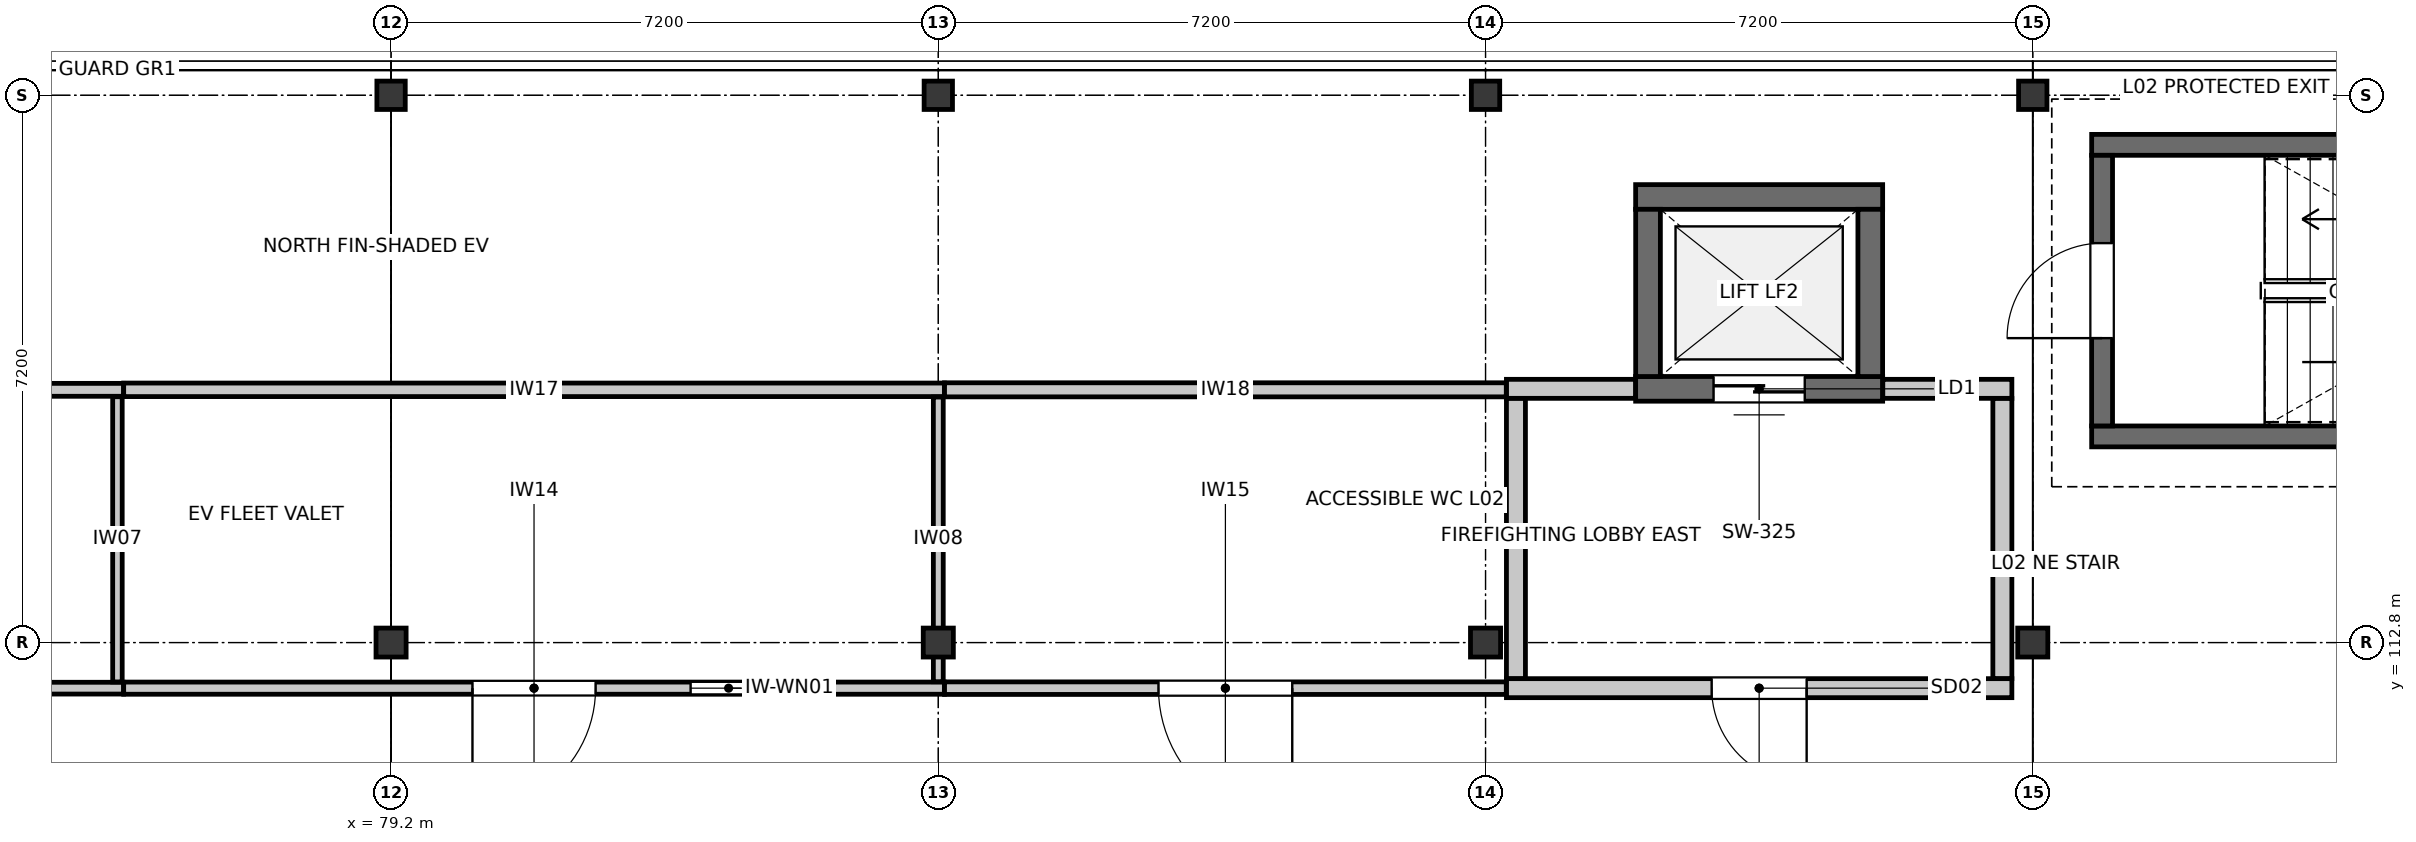
"""IFC4 building model, lengths in metres.
Left out: names, types, materials, properties, quantities, classifications, styles, units other than length and angle.
Written with IfcOpenShell. Run it as: python <this file> out.ifc"""

import sys

from ifc_helpers import new_model, si_unit, direction, frame, frame_2d, origin, origin_2d, place, context, subcontext, project, spatial, rectangle, i_section, extrude, element, fill, save


model = new_model("IFC4")
c1 = context("Model", 3, precision=1e-05, world=origin(), true_north=direction((0.0, 1.0)))
c2 = subcontext(c1, "Body", "Model", "MODEL_VIEW")
j1 = project(units=[si_unit("LENGTHUNIT", "METRE"), si_unit("PLANEANGLEUNIT", "RADIAN")], contexts=[c1])
p1 = place(None, origin())
s1 = spatial("IfcSite", under=j1, at=p1, CompositionType="ELEMENT")
p2 = place(p1, origin())
s2 = spatial("IfcBuilding", under=s1, at=p2, CompositionType="ELEMENT")
p3 = place(p2, frame((0.0, 0.0, 9.3)))
s3 = spatial("IfcBuildingStorey", under=s2, at=p3, CompositionType="ELEMENT", Elevation=9.3)
p4 = place(p3, frame((79.2, 112.8, 0.0), z_axis=(0.0, 0.0, 1.0), x_axis=(1.0, 0.0, 0.0)))
e1 = element("IfcColumn", 1, at=p4, inside=s3, PredefinedType="COLUMN", context=c2, shape_type="SweptSolid", body=[
    extrude(i_section(OverallWidth=0.396, OverallDepth=0.381, WebThickness=0.019, FlangeThickness=0.03, FilletRadius=0.015, at=origin_2d()), origin(), (0.0, 0.0, 1.0), 3.9),
])
p5 = place(p3, frame((79.2, 120.0, 0.0), z_axis=(0.0, 0.0, 1.0), x_axis=(1.0, 0.0, 0.0)))
e2 = element("IfcColumn", 2, at=p5, inside=s3, PredefinedType="COLUMN", context=c2, shape_type="SweptSolid", body=[
    extrude(i_section(OverallWidth=0.373, OverallDepth=0.373, WebThickness=0.016, FlangeThickness=0.026, FilletRadius=0.015, at=origin_2d()), origin(), (0.0, 0.0, 1.0), 3.9),
])
p6 = place(p3, frame((86.4, 112.8, 0.0), z_axis=(0.0, 0.0, 1.0), x_axis=(1.0, 0.0, 0.0)))
e3 = element("IfcColumn", 3, at=p6, inside=s3, PredefinedType="COLUMN", context=c2, shape_type="SweptSolid", body=[
    extrude(i_section(OverallWidth=0.396, OverallDepth=0.381, WebThickness=0.019, FlangeThickness=0.03, FilletRadius=0.015, at=origin_2d()), origin(), (0.0, 0.0, 1.0), 3.9),
])
p7 = place(p3, frame((86.4, 120.0, 0.0), z_axis=(0.0, 0.0, 1.0), x_axis=(1.0, 0.0, 0.0)))
e4 = element("IfcColumn", 4, at=p7, inside=s3, PredefinedType="COLUMN", context=c2, shape_type="SweptSolid", body=[
    extrude(i_section(OverallWidth=0.373, OverallDepth=0.373, WebThickness=0.016, FlangeThickness=0.026, FilletRadius=0.015, at=origin_2d()), origin(), (0.0, 0.0, 1.0), 3.9),
])
p8 = place(p3, frame((93.6, 112.8, 0.0), z_axis=(0.0, 0.0, 1.0), x_axis=(1.0, 0.0, 0.0)))
e5 = element("IfcColumn", 5, at=p8, inside=s3, PredefinedType="COLUMN", context=c2, shape_type="SweptSolid", body=[
    extrude(i_section(OverallWidth=0.396, OverallDepth=0.381, WebThickness=0.019, FlangeThickness=0.03, FilletRadius=0.015, at=origin_2d()), origin(), (0.0, 0.0, 1.0), 3.9),
])
p9 = place(p3, frame((93.6, 120.0, 0.0), z_axis=(0.0, 0.0, 1.0), x_axis=(1.0, 0.0, 0.0)))
e6 = element("IfcColumn", 6, at=p9, inside=s3, PredefinedType="COLUMN", context=c2, shape_type="SweptSolid", body=[
    extrude(i_section(OverallWidth=0.373, OverallDepth=0.373, WebThickness=0.016, FlangeThickness=0.026, FilletRadius=0.015, at=origin_2d()), origin(), (0.0, 0.0, 1.0), 3.9),
])
p10 = place(p3, frame((100.8, 112.8, 0.0), z_axis=(0.0, 0.0, 1.0), x_axis=(1.0, 0.0, 0.0)))
e7 = element("IfcColumn", 7, at=p10, inside=s3, PredefinedType="COLUMN", context=c2, shape_type="SweptSolid", body=[
    extrude(i_section(OverallWidth=0.396, OverallDepth=0.381, WebThickness=0.019, FlangeThickness=0.03, FilletRadius=0.015, at=origin_2d()), origin(), (0.0, 0.0, 1.0), 3.9),
])
p11 = place(p3, frame((100.8, 120.0, 0.0), z_axis=(0.0, 0.0, 1.0), x_axis=(1.0, 0.0, 0.0)))
e8 = element("IfcColumn", 8, at=p11, inside=s3, PredefinedType="COLUMN", context=c2, shape_type="SweptSolid", body=[
    extrude(i_section(OverallWidth=0.373, OverallDepth=0.373, WebThickness=0.016, FlangeThickness=0.026, FilletRadius=0.015, at=origin_2d()), origin(), (0.0, 0.0, 1.0), 3.9),
])
for number, where, z_axis, x_axis in (
    (9, (110.475, 115.512, 0.0), (0.0, 0.0, 1.0), (-1.0, 0.0, 0.0)),
    (10, (101.575, 119.348, 0.0), (0.0, 0.0, 1.0), (1.0, 0.0, 0.0)),
):
    element("IfcWall", number, at=place(p3, frame(where, z_axis=z_axis, x_axis=x_axis)), inside=s3, PredefinedType="SOLIDWALL", context=c2, shape_type="SweptSolid", body=[
        extrude(rectangle(XDim=8.9, YDim=0.275, at=frame_2d((4.45, 0.0))), origin(), (0.0, 0.0, 1.0), 3.69),
    ])
p12 = place(p3, frame((101.712, 115.65, 0.0), z_axis=(0.0, 0.0, 1.0), x_axis=(0.0, 1.0, 0.0)))
e11 = element("IfcWall", 11, at=p12, inside=s3, PredefinedType="SOLIDWALL", context=c2, shape_type="SweptSolid", body=[
    extrude(rectangle(XDim=3.56, YDim=0.275, at=frame_2d((1.78, 0.0))), origin(), (0.0, 0.0, 1.0), 3.69),
])
p13 = place(p12, frame((1.155, 0.0, 0.0)))
e12 = element("IfcOpeningElement", 12, at=p13, cuts=e11, PredefinedType="OPENING", context=c2, shape_type="SweptSolid", body=[
    extrude(rectangle(XDim=1.25, YDim=2.2, at=frame_2d((0.625, 1.1))), frame((0.0, 0.147, 0.0), z_axis=(0.0, -1.0, 0.0), x_axis=(1.0, 0.0, 0.0)), (0.0, 0.0, 1.0), 0.295),
])
p14 = place(p3, frame((98.825, 116.138, 0.0), z_axis=(0.0, 0.0, 1.0), x_axis=(-1.0, 0.0, 0.0)))
e13 = element("IfcWall", 13, at=p14, inside=s3, PredefinedType="SHEAR", context=c2, shape_type="SweptSolid", body=[
    extrude(rectangle(XDim=3.25, YDim=0.325, at=frame_2d((1.625, 0.0))), origin(), (0.0, 0.0, 1.0), 3.69),
])
p15 = place(p14, frame((1.025, 0.0, 0.0)))
e14 = element("IfcOpeningElement", 14, at=p15, cuts=e13, PredefinedType="OPENING", context=c2, shape_type="SweptSolid", body=[
    extrude(rectangle(XDim=1.2, YDim=2.2, at=frame_2d((0.6, 1.1))), frame((0.0, 0.172, 0.0), z_axis=(0.0, -1.0, 0.0), x_axis=(1.0, 0.0, 0.0)), (0.0, 0.0, 1.0), 0.345),
])
p16 = place(p3, frame((95.575, 118.662, 0.0), z_axis=(0.0, 0.0, 1.0), x_axis=(1.0, 0.0, 0.0)))
e15 = element("IfcWall", 15, at=p16, inside=s3, PredefinedType="SHEAR", context=c2, shape_type="SweptSolid", body=[
    extrude(rectangle(XDim=3.25, YDim=0.325, at=frame_2d((1.625, 0.0))), origin(), (0.0, 0.0, 1.0), 3.69),
])
for number, where, z_axis, x_axis in (
    (16, (95.738, 116.3, 0.0), (0.0, 0.0, 1.0), (0.0, 1.0, 0.0)),
    (17, (98.662, 118.5, 0.0), (0.0, 0.0, 1.0), (0.0, -1.0, 0.0)),
):
    element("IfcWall", number, at=place(p3, frame(where, z_axis=z_axis, x_axis=x_axis)), inside=s3, PredefinedType="SHEAR", context=c2, shape_type="SweptSolid", body=[
        extrude(rectangle(XDim=2.2, YDim=0.325, at=frame_2d((1.1, 0.0))), origin(), (0.0, 0.0, 1.0), 3.69),
    ])
p17 = place(p3, frame((100.525, 112.2, 0.0), z_axis=(0.0, 0.0, 1.0), x_axis=(-1.0, 0.0, 0.0)))
e18 = element("IfcWall", 18, at=p17, inside=s3, PredefinedType="PARTITIONING", context=c2, shape_type="SweptSolid", body=[
    extrude(rectangle(XDim=6.65, YDim=0.25, at=frame_2d((3.325, 0.0))), origin(), (0.0, 0.0, 1.0), 3.058),
])
p18 = place(p17, frame((2.7, 0.0, 0.0)))
e19 = element("IfcOpeningElement", 19, at=p18, cuts=e18, PredefinedType="OPENING", context=c2, shape_type="SweptSolid", body=[
    extrude(rectangle(XDim=1.25, YDim=2.2, at=frame_2d((0.625, 1.1))), frame((0.0, 0.135, 0.0), z_axis=(0.0, -1.0, 0.0), x_axis=(1.0, 0.0, 0.0)), (0.0, 0.0, 1.0), 0.27),
])
for number, where, z_axis, x_axis in (
    (20, (93.875, 116.138, 0.0), (0.0, 0.0, 1.0), (1.0, 0.0, 0.0)),
    (21, (98.827, 116.138, 0.0), (0.0, 0.0, 1.0), (1.0, 0.0, 0.0)),
):
    element("IfcWall", number, at=place(p3, frame(where, z_axis=z_axis, x_axis=x_axis)), inside=s3, PredefinedType="PARTITIONING", context=c2, shape_type="SweptSolid", body=[
        extrude(rectangle(XDim=1.698, YDim=0.25, at=frame_2d((0.849, 0.0))), origin(), (0.0, 0.0, 1.0), 3.058),
    ])
for number, where, z_axis, x_axis in (
    (22, (94.0, 112.327, 0.0), (0.0, 0.0, 1.0), (0.0, 1.0, 0.0)),
    (23, (100.4, 116.011, 0.0), (0.0, 0.0, 1.0), (0.0, -1.0, 0.0)),
):
    element("IfcWall", number, at=place(p3, frame(where, z_axis=z_axis, x_axis=x_axis)), inside=s3, PredefinedType="PARTITIONING", context=c2, shape_type="SweptSolid", body=[
        extrude(rectangle(XDim=3.684, YDim=0.25, at=frame_2d((1.842, 0.0))), origin(), (0.0, 0.0, 1.0), 3.058),
    ])
p19 = place(p3, frame((75.68, 112.2, 0.0), z_axis=(0.0, 0.0, 1.0), x_axis=(-1.0, 0.0, 0.0)))
e24 = element("IfcWall", 24, at=p19, inside=s3, PredefinedType="PARTITIONING", context=c2, shape_type="SweptSolid", body=[
    extrude(rectangle(XDim=11.153, YDim=0.155, at=frame_2d((5.576, 0.0))), origin(), (0.0, 0.0, 1.0), 3.058),
])
p20 = place(p19, frame((4.852, 0.0, 0.0)))
e25 = element("IfcOpeningElement", 25, at=p20, cuts=e24, PredefinedType="OPENING", context=c2, shape_type="SweptSolid", body=[
    extrude(rectangle(XDim=1.45, YDim=2.34, at=frame_2d((0.725, 1.17))), frame((0.0, 0.087, 0.0), z_axis=(0.0, -1.0, 0.0), x_axis=(1.0, 0.0, 0.0)), (0.0, 0.0, 1.0), 0.175),
])
p21 = place(p3, frame((86.48, 112.2, 0.0), z_axis=(0.0, 0.0, 1.0), x_axis=(-1.0, 0.0, 0.0)))
e26 = element("IfcWall", 26, at=p21, inside=s3, PredefinedType="PARTITIONING", context=c2, shape_type="SweptSolid", body=[
    extrude(rectangle(XDim=10.798, YDim=0.16, at=frame_2d((5.399, 0.0))), origin(), (0.0, 0.0, 1.0), 3.058),
])
p22 = place(p21, frame((4.589, 0.0, 0.0)))
e27 = element("IfcOpeningElement", 27, at=p22, cuts=e26, PredefinedType="OPENING", context=c2, shape_type="SweptSolid", body=[
    extrude(rectangle(XDim=1.62, YDim=2.34, at=frame_2d((0.81, 1.17))), frame((0.0, 0.09, 0.0), z_axis=(0.0, -1.0, 0.0), x_axis=(1.0, 0.0, 0.0)), (0.0, 0.0, 1.0), 0.18),
])
p23 = place(p21, frame((2.339, 0.0, 0.95)))
e28 = element("IfcOpeningElement", 28, at=p23, cuts=e26, PredefinedType="OPENING", context=c2, shape_type="SweptSolid", body=[
    extrude(rectangle(XDim=1.0, YDim=1.0, at=frame_2d((0.5, 0.5))), frame((0.0, 0.09, 0.0), z_axis=(0.0, -1.0, 0.0), x_axis=(1.0, 0.0, 0.0)), (0.0, 0.0, 1.0), 0.18),
])
p24 = place(p3, frame((93.873, 112.2, 0.0), z_axis=(0.0, 0.0, 1.0), x_axis=(-1.0, 0.0, 0.0)))
e29 = element("IfcWall", 29, at=p24, inside=s3, PredefinedType="PARTITIONING", context=c2, shape_type="SweptSolid", body=[
    extrude(rectangle(XDim=7.391, YDim=0.165, at=frame_2d((3.696, 0.0))), origin(), (0.0, 0.0, 1.0), 3.058),
])
p25 = place(p24, frame((2.816, 0.0, 0.0)))
e30 = element("IfcOpeningElement", 30, at=p25, cuts=e29, PredefinedType="OPENING", context=c2, shape_type="SweptSolid", body=[
    extrude(rectangle(XDim=1.76, YDim=2.34, at=frame_2d((0.88, 1.17))), frame((0.0, 0.093, 0.0), z_axis=(0.0, -1.0, 0.0), x_axis=(1.0, 0.0, 0.0)), (0.0, 0.0, 1.0), 0.185),
])
p26 = place(p3, frame((64.527, 116.125, 0.0), z_axis=(0.0, 0.0, 1.0), x_axis=(1.0, 0.0, 0.0)))
e31 = element("IfcWall", 31, at=p26, inside=s3, PredefinedType="PARTITIONING", context=c2, shape_type="SweptSolid", body=[
    extrude(rectangle(XDim=11.153, YDim=0.17, at=frame_2d((5.576, 0.0))), origin(), (0.0, 0.0, 1.0), 3.058),
])
p27 = place(p3, frame((75.682, 116.125, 0.0), z_axis=(0.0, 0.0, 1.0), x_axis=(1.0, 0.0, 0.0)))
e32 = element("IfcWall", 32, at=p27, inside=s3, PredefinedType="PARTITIONING", context=c2, shape_type="SweptSolid", body=[
    extrude(rectangle(XDim=10.798, YDim=0.178, at=frame_2d((5.399, 0.0))), origin(), (0.0, 0.0, 1.0), 3.058),
])
p28 = place(p3, frame((86.482, 116.125, 0.0), z_axis=(0.0, 0.0, 1.0), x_axis=(1.0, 0.0, 0.0)))
e33 = element("IfcWall", 33, at=p28, inside=s3, PredefinedType="PARTITIONING", context=c2, shape_type="SweptSolid", body=[
    extrude(rectangle(XDim=7.391, YDim=0.185, at=frame_2d((3.696, 0.0))), origin(), (0.0, 0.0, 1.0), 3.058),
])
p29 = place(p3, frame((75.6, 116.034, 0.0), z_axis=(0.0, 0.0, 1.0), x_axis=(0.0, -1.0, 0.0)))
e34 = element("IfcWall", 34, at=p29, inside=s3, PredefinedType="PARTITIONING", context=c2, shape_type="SweptSolid", body=[
    extrude(rectangle(XDim=3.752, YDim=0.125, at=frame_2d((1.876, 0.0))), origin(), (0.0, 0.0, 1.0), 3.058),
])
p30 = place(p3, frame((86.4, 116.03, 0.0), z_axis=(0.0, 0.0, 1.0), x_axis=(0.0, -1.0, 0.0)))
e35 = element("IfcWall", 35, at=p30, inside=s3, PredefinedType="PARTITIONING", context=c2, shape_type="SweptSolid", body=[
    extrude(rectangle(XDim=3.745, YDim=0.13, at=frame_2d((1.873, 0.0))), origin(), (0.0, 0.0, 1.0), 3.058),
])
p31 = place(p13, origin())
e36 = element("IfcDoor", 36, at=p31, inside=s3, OperationType="SINGLE_SWING_LEFT", PredefinedType="DOOR", context=c2, shape_type="SweptSolid", body=[
    extrude(rectangle(XDim=1.25, YDim=2.2, at=frame_2d((0.625, 1.1))), frame((0.0, 0.025, 0.0), z_axis=(0.0, -1.0, 0.0), x_axis=(1.0, 0.0, 0.0)), (0.0, 0.0, 1.0), 0.05),
])
fill(e12, e36)
p32 = place(p15, origin())
e37 = element("IfcDoor", 37, at=p32, inside=s3, OperationType="DOUBLE_DOOR_SLIDING", PredefinedType="DOOR", context=c2, shape_type="SweptSolid", body=[
    extrude(rectangle(XDim=1.2, YDim=2.2, at=frame_2d((0.6, 1.1))), frame((0.0, 0.025, 0.0), z_axis=(0.0, -1.0, 0.0), x_axis=(1.0, 0.0, 0.0)), (0.0, 0.0, 1.0), 0.05),
])
fill(e14, e37)
p33 = place(p18, origin())
e38 = element("IfcDoor", 38, at=p33, inside=s3, OperationType="SINGLE_SWING_LEFT", PredefinedType="DOOR", context=c2, shape_type="SweptSolid", body=[
    extrude(rectangle(XDim=1.25, YDim=2.2, at=frame_2d((0.625, 1.1))), frame((0.0, 0.025, 0.0), z_axis=(0.0, -1.0, 0.0), x_axis=(1.0, 0.0, 0.0)), (0.0, 0.0, 1.0), 0.05),
])
fill(e19, e38)
p34 = place(p22, origin())
e39 = element("IfcDoor", 39, at=p34, inside=s3, OperationType="SINGLE_SWING_RIGHT", PredefinedType="DOOR", context=c2, shape_type="SweptSolid", body=[
    extrude(rectangle(XDim=1.62, YDim=2.34, at=frame_2d((0.81, 1.17))), frame((0.0, 0.025, 0.0), z_axis=(0.0, -1.0, 0.0), x_axis=(1.0, 0.0, 0.0)), (0.0, 0.0, 1.0), 0.05),
])
fill(e27, e39)
p35 = place(p23, origin())
e40 = element("IfcWindow", 40, at=p35, inside=s3, PartitioningType="SINGLE_PANEL", PredefinedType="WINDOW", context=c2, shape_type="SweptSolid", body=[
    extrude(rectangle(XDim=1.0, YDim=1.0, at=frame_2d((0.5, 0.5))), frame((0.0, 0.03, 0.0), z_axis=(0.0, -1.0, 0.0), x_axis=(1.0, 0.0, 0.0)), (0.0, 0.0, 1.0), 0.06),
])
fill(e28, e40)
p36 = place(p25, origin())
e41 = element("IfcDoor", 41, at=p36, inside=s3, OperationType="SINGLE_SWING_LEFT", PredefinedType="DOOR", context=c2, shape_type="SweptSolid", body=[
    extrude(rectangle(XDim=1.76, YDim=2.34, at=frame_2d((0.88, 1.17))), frame((0.0, 0.025, 0.0), z_axis=(0.0, -1.0, 0.0), x_axis=(1.0, 0.0, 0.0)), (0.0, 0.0, 1.0), 0.05),
])
fill(e30, e41)
save(model, sys.argv[1])
